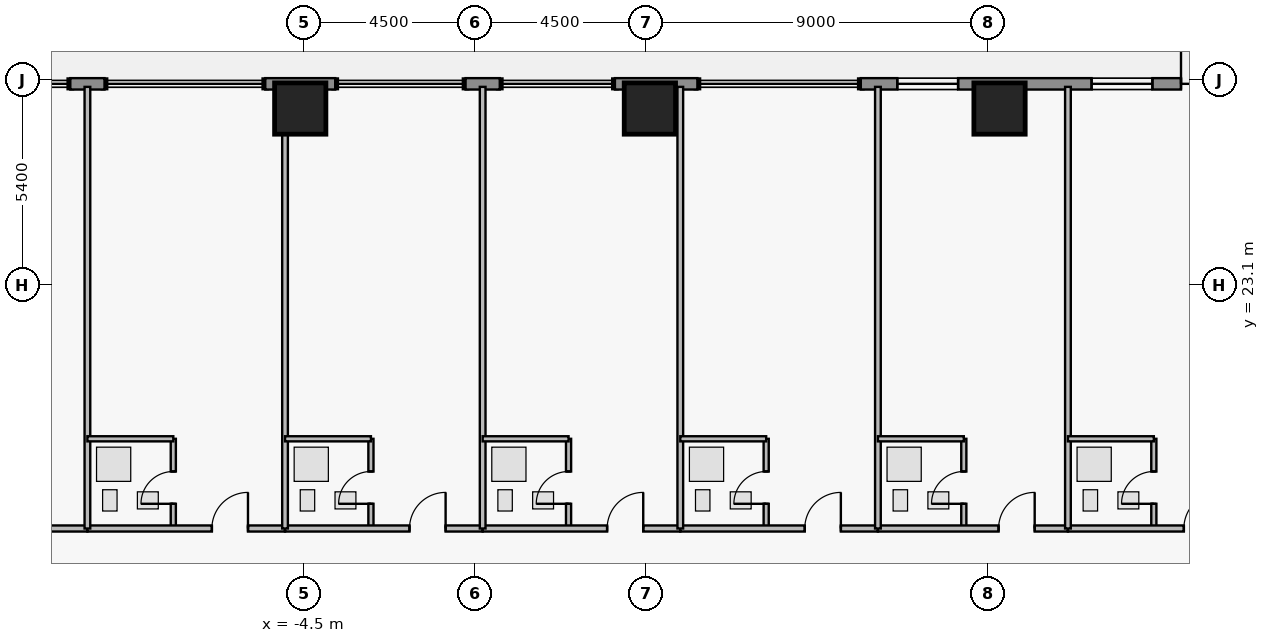
"""IFC4 building model, lengths in metres.
Left out: names, types, materials, properties, quantities, classifications, styles, units other than length and angle.
Written with IfcOpenShell. Run it as: python <this file> out.ifc"""

import sys

from ifc_helpers import new_model, si_unit, direction, frame, frame_2d, origin, origin_2d, place, context, subcontext, project, spatial, rectangle, extrude, element, fill, save


model = new_model("IFC4")
c1 = context("Model", 3, precision=1e-05, world=origin(), true_north=direction((0.0, 1.0)))
c2 = subcontext(c1, "Body", "Model", "MODEL_VIEW")
j1 = project(units=[si_unit("LENGTHUNIT", "METRE"), si_unit("PLANEANGLEUNIT", "RADIAN")], contexts=[c1])
p1 = place(None, origin())
s1 = spatial("IfcSite", under=j1, at=p1, CompositionType="ELEMENT")
p2 = place(p1, origin())
s2 = spatial("IfcBuilding", under=s1, at=p2, CompositionType="ELEMENT")
p3 = place(p2, frame((0.0, 0.0, 150.4)))
s3 = spatial("IfcBuildingStorey", under=s2, at=p3, CompositionType="ELEMENT", Elevation=150.4)
for number, where, z_axis, x_axis in (
    (1, (-4.6, 27.75, 0.0), (0.0, 0.0, 1.0), (1.0, 0.0, 0.0)),
    (2, (4.6, 27.75, 0.0), (0.0, 0.0, 1.0), (1.0, 0.0, 0.0)),
    (3, (13.8, 27.75, 0.0), (0.0, 0.0, 1.0), (1.0, 0.0, 0.0)),
):
    element("IfcColumn", number, at=place(p3, frame(where, z_axis=z_axis, x_axis=x_axis)), inside=s3, PredefinedType="COLUMN", context=c2, shape_type="SweptSolid", body=[
        extrude(rectangle(XDim=1.35, YDim=1.35, at=origin_2d()), origin(), (0.0, 0.0, 1.0), 3.65),
    ])
p4 = place(p3, frame((-10.65, 28.4, 0.0), z_axis=(0.0, 0.0, 1.0), x_axis=(1.0, 0.0, 0.0)))
e4 = element("IfcWall", 4, at=p4, inside=s3, PredefinedType="STANDARD", context=c2, shape_type="SweptSolid", body=[
    extrude(rectangle(XDim=0.9, YDim=0.3, at=frame_2d((0.45, 0.0))), origin(), (0.0, 0.0, 1.0), 3.43),
])
p5 = place(p3, frame((-5.52, 28.4, 0.0), z_axis=(0.0, 0.0, 1.0), x_axis=(1.0, 0.0, 0.0)))
e5 = element("IfcWall", 5, at=p5, inside=s3, PredefinedType="STANDARD", context=c2, shape_type="SweptSolid", body=[
    extrude(rectangle(XDim=1.84, YDim=0.3, at=frame_2d((0.92, 0.0))), origin(), (0.0, 0.0, 1.0), 3.43),
])
p6 = place(p3, frame((-0.25, 28.4, 0.0), z_axis=(0.0, 0.0, 1.0), x_axis=(1.0, 0.0, 0.0)))
e6 = element("IfcWall", 6, at=p6, inside=s3, PredefinedType="STANDARD", context=c2, shape_type="SweptSolid", body=[
    extrude(rectangle(XDim=0.9, YDim=0.3, at=frame_2d((0.45, 0.0))), origin(), (0.0, 0.0, 1.0), 3.43),
])
p7 = place(p3, frame((3.68, 28.4, 0.0), z_axis=(0.0, 0.0, 1.0), x_axis=(1.0, 0.0, 0.0)))
e7 = element("IfcWall", 7, at=p7, inside=s3, PredefinedType="STANDARD", context=c2, shape_type="SweptSolid", body=[
    extrude(rectangle(XDim=2.17, YDim=0.3, at=frame_2d((1.085, 0.0))), origin(), (0.0, 0.0, 1.0), 3.43),
])
p8 = place(p3, frame((10.15, 28.4, 0.0), z_axis=(0.0, 0.0, 1.0), x_axis=(1.0, 0.0, 0.0)))
e8 = element("IfcWall", 8, at=p8, inside=s3, PredefinedType="STANDARD", context=c2, shape_type="SweptSolid", body=[
    extrude(rectangle(XDim=10.25, YDim=0.3, at=frame_2d((5.125, 0.0))), origin(), (0.0, 0.0, 1.0), 3.43),
])
p9 = place(p8, frame((8.425, 0.0, 0.0)))
e9 = element("IfcOpeningElement", 9, at=p9, cuts=e8, PredefinedType="OPENING", context=c2, shape_type="SweptSolid", body=[
    extrude(rectangle(XDim=1.05, YDim=2.2, at=frame_2d((0.525, 1.1))), frame((0.0, 0.16, 0.0), z_axis=(0.0, -1.0, 0.0), x_axis=(1.0, 0.0, 0.0)), (0.0, 0.0, 1.0), 0.32),
])
p10 = place(p8, frame((0.96, 0.0, 0.85)))
e10 = element("IfcOpeningElement", 10, at=p10, cuts=e8, PredefinedType="OPENING", context=c2, shape_type="SweptSolid", body=[
    extrude(rectangle(XDim=1.6, YDim=1.8, at=frame_2d((0.8, 0.9))), frame((0.0, 0.16, 0.0), z_axis=(0.0, -1.0, 0.0), x_axis=(1.0, 0.0, 0.0)), (0.0, 0.0, 1.0), 0.32),
])
p11 = place(p8, frame((6.073, 0.0, 0.85)))
e11 = element("IfcOpeningElement", 11, at=p11, cuts=e8, PredefinedType="OPENING", context=c2, shape_type="SweptSolid", body=[
    extrude(rectangle(XDim=1.6, YDim=1.8, at=frame_2d((0.8, 0.9))), frame((0.0, 0.16, 0.0), z_axis=(0.0, -1.0, 0.0), x_axis=(1.0, 0.0, 0.0)), (0.0, 0.0, 1.0), 0.32),
])
p12 = place(p3, frame((-15.4, 16.7, 0.0), z_axis=(0.0, 0.0, 1.0), x_axis=(1.0, 0.0, 0.0)))
e12 = element("IfcWall", 12, at=p12, inside=s3, PredefinedType="PARTITIONING", context=c2, shape_type="SweptSolid", body=[
    extrude(rectangle(XDim=5.2, YDim=0.16, at=frame_2d((2.6, 0.0))), origin(), (0.0, 0.0, 1.0), 2.973),
])
p13 = place(p12, frame((3.275, 0.0, 0.0)))
e13 = element("IfcOpeningElement", 13, at=p13, cuts=e12, PredefinedType="OPENING", context=c2, shape_type="SweptSolid", body=[
    extrude(rectangle(XDim=0.95, YDim=2.15, at=frame_2d((0.475, 1.075))), frame((0.0, 0.09, 0.0), z_axis=(0.0, -1.0, 0.0), x_axis=(1.0, 0.0, 0.0)), (0.0, 0.0, 1.0), 0.18),
])
p14 = place(p3, frame((-7.94, 16.7, 0.0), z_axis=(0.0, 0.0, 1.0), x_axis=(0.0, 1.0, 0.0)))
e14 = element("IfcWall", 14, at=p14, inside=s3, PredefinedType="PLUMBINGWALL", context=c2, shape_type="SweptSolid", body=[
    extrude(rectangle(XDim=2.36, YDim=0.135, at=frame_2d((1.18, 0.0))), origin(), (0.0, 0.0, 1.0), 3.43),
])
p15 = place(p14, frame((0.65, 0.0, 0.0)))
e15 = element("IfcOpeningElement", 15, at=p15, cuts=e14, PredefinedType="OPENING", context=c2, shape_type="SweptSolid", body=[
    extrude(rectangle(XDim=0.85, YDim=2.1, at=frame_2d((0.425, 1.05))), frame((0.0, 0.077, 0.0), z_axis=(0.0, -1.0, 0.0), x_axis=(1.0, 0.0, 0.0)), (0.0, 0.0, 1.0), 0.155),
])
p16 = place(p3, frame((-10.2, 16.7, 0.0), z_axis=(0.0, 0.0, 1.0), x_axis=(1.0, 0.0, 0.0)))
e16 = element("IfcWall", 16, at=p16, inside=s3, PredefinedType="PARTITIONING", context=c2, shape_type="SweptSolid", body=[
    extrude(rectangle(XDim=5.2, YDim=0.16, at=frame_2d((2.6, 0.0))), origin(), (0.0, 0.0, 1.0), 2.973),
])
p17 = place(p16, frame((3.275, 0.0, 0.0)))
e17 = element("IfcOpeningElement", 17, at=p17, cuts=e16, PredefinedType="OPENING", context=c2, shape_type="SweptSolid", body=[
    extrude(rectangle(XDim=0.95, YDim=2.15, at=frame_2d((0.475, 1.075))), frame((0.0, 0.09, 0.0), z_axis=(0.0, -1.0, 0.0), x_axis=(1.0, 0.0, 0.0)), (0.0, 0.0, 1.0), 0.18),
])
p18 = place(p3, frame((-2.74, 16.7, 0.0), z_axis=(0.0, 0.0, 1.0), x_axis=(0.0, 1.0, 0.0)))
e18 = element("IfcWall", 18, at=p18, inside=s3, PredefinedType="PLUMBINGWALL", context=c2, shape_type="SweptSolid", body=[
    extrude(rectangle(XDim=2.36, YDim=0.135, at=frame_2d((1.18, 0.0))), origin(), (0.0, 0.0, 1.0), 3.43),
])
p19 = place(p18, frame((0.65, 0.0, 0.0)))
e19 = element("IfcOpeningElement", 19, at=p19, cuts=e18, PredefinedType="OPENING", context=c2, shape_type="SweptSolid", body=[
    extrude(rectangle(XDim=0.85, YDim=2.1, at=frame_2d((0.425, 1.05))), frame((0.0, 0.077, 0.0), z_axis=(0.0, -1.0, 0.0), x_axis=(1.0, 0.0, 0.0)), (0.0, 0.0, 1.0), 0.155),
])
p20 = place(p3, frame((-5.0, 16.7, 0.0), z_axis=(0.0, 0.0, 1.0), x_axis=(1.0, 0.0, 0.0)))
e20 = element("IfcWall", 20, at=p20, inside=s3, PredefinedType="PARTITIONING", context=c2, shape_type="SweptSolid", body=[
    extrude(rectangle(XDim=5.2, YDim=0.16, at=frame_2d((2.6, 0.0))), origin(), (0.0, 0.0, 1.0), 2.973),
])
p21 = place(p20, frame((3.275, 0.0, 0.0)))
e21 = element("IfcOpeningElement", 21, at=p21, cuts=e20, PredefinedType="OPENING", context=c2, shape_type="SweptSolid", body=[
    extrude(rectangle(XDim=0.95, YDim=2.15, at=frame_2d((0.475, 1.075))), frame((0.0, 0.09, 0.0), z_axis=(0.0, -1.0, 0.0), x_axis=(1.0, 0.0, 0.0)), (0.0, 0.0, 1.0), 0.18),
])
p22 = place(p3, frame((2.46, 16.7, 0.0), z_axis=(0.0, 0.0, 1.0), x_axis=(0.0, 1.0, 0.0)))
e22 = element("IfcWall", 22, at=p22, inside=s3, PredefinedType="PLUMBINGWALL", context=c2, shape_type="SweptSolid", body=[
    extrude(rectangle(XDim=2.36, YDim=0.135, at=frame_2d((1.18, 0.0))), origin(), (0.0, 0.0, 1.0), 3.43),
])
p23 = place(p22, frame((0.65, 0.0, 0.0)))
e23 = element("IfcOpeningElement", 23, at=p23, cuts=e22, PredefinedType="OPENING", context=c2, shape_type="SweptSolid", body=[
    extrude(rectangle(XDim=0.85, YDim=2.1, at=frame_2d((0.425, 1.05))), frame((0.0, 0.077, 0.0), z_axis=(0.0, -1.0, 0.0), x_axis=(1.0, 0.0, 0.0)), (0.0, 0.0, 1.0), 0.155),
])
p24 = place(p3, frame((0.2, 16.7, 0.0), z_axis=(0.0, 0.0, 1.0), x_axis=(1.0, 0.0, 0.0)))
e24 = element("IfcWall", 24, at=p24, inside=s3, PredefinedType="PARTITIONING", context=c2, shape_type="SweptSolid", body=[
    extrude(rectangle(XDim=5.2, YDim=0.16, at=frame_2d((2.6, 0.0))), origin(), (0.0, 0.0, 1.0), 2.973),
])
p25 = place(p24, frame((3.275, 0.0, 0.0)))
e25 = element("IfcOpeningElement", 25, at=p25, cuts=e24, PredefinedType="OPENING", context=c2, shape_type="SweptSolid", body=[
    extrude(rectangle(XDim=0.95, YDim=2.15, at=frame_2d((0.475, 1.075))), frame((0.0, 0.09, 0.0), z_axis=(0.0, -1.0, 0.0), x_axis=(1.0, 0.0, 0.0)), (0.0, 0.0, 1.0), 0.18),
])
p26 = place(p3, frame((7.66, 16.7, 0.0), z_axis=(0.0, 0.0, 1.0), x_axis=(0.0, 1.0, 0.0)))
e26 = element("IfcWall", 26, at=p26, inside=s3, PredefinedType="PLUMBINGWALL", context=c2, shape_type="SweptSolid", body=[
    extrude(rectangle(XDim=2.36, YDim=0.135, at=frame_2d((1.18, 0.0))), origin(), (0.0, 0.0, 1.0), 3.43),
])
p27 = place(p26, frame((0.65, 0.0, 0.0)))
e27 = element("IfcOpeningElement", 27, at=p27, cuts=e26, PredefinedType="OPENING", context=c2, shape_type="SweptSolid", body=[
    extrude(rectangle(XDim=0.85, YDim=2.1, at=frame_2d((0.425, 1.05))), frame((0.0, 0.077, 0.0), z_axis=(0.0, -1.0, 0.0), x_axis=(1.0, 0.0, 0.0)), (0.0, 0.0, 1.0), 0.155),
])
p28 = place(p3, frame((5.4, 16.7, 0.0), z_axis=(0.0, 0.0, 1.0), x_axis=(1.0, 0.0, 0.0)))
e28 = element("IfcWall", 28, at=p28, inside=s3, PredefinedType="PARTITIONING", context=c2, shape_type="SweptSolid", body=[
    extrude(rectangle(XDim=5.2, YDim=0.16, at=frame_2d((2.6, 0.0))), origin(), (0.0, 0.0, 1.0), 2.973),
])
p29 = place(p28, frame((3.275, 0.0, 0.0)))
e29 = element("IfcOpeningElement", 29, at=p29, cuts=e28, PredefinedType="OPENING", context=c2, shape_type="SweptSolid", body=[
    extrude(rectangle(XDim=0.95, YDim=2.15, at=frame_2d((0.475, 1.075))), frame((0.0, 0.09, 0.0), z_axis=(0.0, -1.0, 0.0), x_axis=(1.0, 0.0, 0.0)), (0.0, 0.0, 1.0), 0.18),
])
p30 = place(p3, frame((12.86, 16.7, 0.0), z_axis=(0.0, 0.0, 1.0), x_axis=(0.0, 1.0, 0.0)))
e30 = element("IfcWall", 30, at=p30, inside=s3, PredefinedType="PLUMBINGWALL", context=c2, shape_type="SweptSolid", body=[
    extrude(rectangle(XDim=2.36, YDim=0.135, at=frame_2d((1.18, 0.0))), origin(), (0.0, 0.0, 1.0), 3.43),
])
p31 = place(p30, frame((0.65, 0.0, 0.0)))
e31 = element("IfcOpeningElement", 31, at=p31, cuts=e30, PredefinedType="OPENING", context=c2, shape_type="SweptSolid", body=[
    extrude(rectangle(XDim=0.85, YDim=2.1, at=frame_2d((0.425, 1.05))), frame((0.0, 0.077, 0.0), z_axis=(0.0, -1.0, 0.0), x_axis=(1.0, 0.0, 0.0)), (0.0, 0.0, 1.0), 0.155),
])
p32 = place(p3, frame((10.6, 16.7, 0.0), z_axis=(0.0, 0.0, 1.0), x_axis=(1.0, 0.0, 0.0)))
e32 = element("IfcWall", 32, at=p32, inside=s3, PredefinedType="PARTITIONING", context=c2, shape_type="SweptSolid", body=[
    extrude(rectangle(XDim=5.0, YDim=0.16, at=frame_2d((2.5, 0.0))), origin(), (0.0, 0.0, 1.0), 2.973),
])
p33 = place(p32, frame((3.175, 0.0, 0.0)))
e33 = element("IfcOpeningElement", 33, at=p33, cuts=e32, PredefinedType="OPENING", context=c2, shape_type="SweptSolid", body=[
    extrude(rectangle(XDim=0.95, YDim=2.15, at=frame_2d((0.475, 1.075))), frame((0.0, 0.09, 0.0), z_axis=(0.0, -1.0, 0.0), x_axis=(1.0, 0.0, 0.0)), (0.0, 0.0, 1.0), 0.18),
])
p34 = place(p3, frame((17.86, 16.7, 0.0), z_axis=(0.0, 0.0, 1.0), x_axis=(0.0, 1.0, 0.0)))
e34 = element("IfcWall", 34, at=p34, inside=s3, PredefinedType="PLUMBINGWALL", context=c2, shape_type="SweptSolid", body=[
    extrude(rectangle(XDim=2.36, YDim=0.135, at=frame_2d((1.18, 0.0))), origin(), (0.0, 0.0, 1.0), 3.43),
])
p35 = place(p34, frame((0.65, 0.0, 0.0)))
e35 = element("IfcOpeningElement", 35, at=p35, cuts=e34, PredefinedType="OPENING", context=c2, shape_type="SweptSolid", body=[
    extrude(rectangle(XDim=0.85, YDim=2.1, at=frame_2d((0.425, 1.05))), frame((0.0, 0.077, 0.0), z_axis=(0.0, -1.0, 0.0), x_axis=(1.0, 0.0, 0.0)), (0.0, 0.0, 1.0), 0.155),
])
p36 = place(p3, frame((15.6, 16.7, 0.0), z_axis=(0.0, 0.0, 1.0), x_axis=(1.0, 0.0, 0.0)))
e36 = element("IfcWall", 36, at=p36, inside=s3, PredefinedType="PARTITIONING", context=c2, shape_type="SweptSolid", body=[
    extrude(rectangle(XDim=5.0, YDim=0.16, at=frame_2d((2.5, 0.0))), origin(), (0.0, 0.0, 1.0), 3.43),
])
p37 = place(p36, frame((3.05, 0.0, 0.0)))
e37 = element("IfcOpeningElement", 37, at=p37, cuts=e36, PredefinedType="OPENING", context=c2, shape_type="SweptSolid", body=[
    extrude(rectangle(XDim=0.95, YDim=2.15, at=frame_2d((0.475, 1.075))), frame((0.0, 0.09, 0.0), z_axis=(0.0, -1.0, 0.0), x_axis=(1.0, 0.0, 0.0)), (0.0, 0.0, 1.0), 0.18),
])
p38 = place(p3, frame((-10.2, 16.7, 0.0), z_axis=(0.0, 0.0, 1.0), x_axis=(0.0, 1.0, 0.0)))
e38 = element("IfcWall", 38, at=p38, inside=s3, PredefinedType="PARTITIONING", context=c2, shape_type="SweptSolid", body=[
    extrude(rectangle(XDim=11.62, YDim=0.15, at=frame_2d((5.81, 0.0))), origin(), (0.0, 0.0, 1.0), 3.43),
])
p39 = place(p3, frame((-10.2, 19.06, 0.0), z_axis=(0.0, 0.0, 1.0), x_axis=(1.0, 0.0, 0.0)))
e39 = element("IfcWall", 39, at=p39, inside=s3, PredefinedType="PLUMBINGWALL", context=c2, shape_type="SweptSolid", body=[
    extrude(rectangle(XDim=2.26, YDim=0.135, at=frame_2d((1.13, 0.0))), origin(), (0.0, 0.0, 1.0), 2.973),
])
p40 = place(p3, frame((-5.0, 16.7, 0.0), z_axis=(0.0, 0.0, 1.0), x_axis=(0.0, 1.0, 0.0)))
e40 = element("IfcWall", 40, at=p40, inside=s3, PredefinedType="PARTITIONING", context=c2, shape_type="SweptSolid", body=[
    extrude(rectangle(XDim=11.62, YDim=0.15, at=frame_2d((5.81, 0.0))), origin(), (0.0, 0.0, 1.0), 2.503),
])
p41 = place(p3, frame((-5.0, 19.06, 0.0), z_axis=(0.0, 0.0, 1.0), x_axis=(1.0, 0.0, 0.0)))
e41 = element("IfcWall", 41, at=p41, inside=s3, PredefinedType="PLUMBINGWALL", context=c2, shape_type="SweptSolid", body=[
    extrude(rectangle(XDim=2.26, YDim=0.135, at=frame_2d((1.13, 0.0))), origin(), (0.0, 0.0, 1.0), 2.973),
])
p42 = place(p3, frame((0.2, 16.7, 0.0), z_axis=(0.0, 0.0, 1.0), x_axis=(0.0, 1.0, 0.0)))
e42 = element("IfcWall", 42, at=p42, inside=s3, PredefinedType="PARTITIONING", context=c2, shape_type="SweptSolid", body=[
    extrude(rectangle(XDim=11.62, YDim=0.15, at=frame_2d((5.81, 0.0))), origin(), (0.0, 0.0, 1.0), 3.43),
])
p43 = place(p3, frame((0.2, 19.06, 0.0), z_axis=(0.0, 0.0, 1.0), x_axis=(1.0, 0.0, 0.0)))
e43 = element("IfcWall", 43, at=p43, inside=s3, PredefinedType="PLUMBINGWALL", context=c2, shape_type="SweptSolid", body=[
    extrude(rectangle(XDim=2.26, YDim=0.135, at=frame_2d((1.13, 0.0))), origin(), (0.0, 0.0, 1.0), 2.973),
])
p44 = place(p3, frame((5.4, 16.7, 0.0), z_axis=(0.0, 0.0, 1.0), x_axis=(0.0, 1.0, 0.0)))
e44 = element("IfcWall", 44, at=p44, inside=s3, PredefinedType="PARTITIONING", context=c2, shape_type="SweptSolid", body=[
    extrude(rectangle(XDim=11.62, YDim=0.15, at=frame_2d((5.81, 0.0))), origin(), (0.0, 0.0, 1.0), 3.43),
])
p45 = place(p3, frame((5.4, 19.06, 0.0), z_axis=(0.0, 0.0, 1.0), x_axis=(1.0, 0.0, 0.0)))
e45 = element("IfcWall", 45, at=p45, inside=s3, PredefinedType="PLUMBINGWALL", context=c2, shape_type="SweptSolid", body=[
    extrude(rectangle(XDim=2.26, YDim=0.135, at=frame_2d((1.13, 0.0))), origin(), (0.0, 0.0, 1.0), 2.973),
])
p46 = place(p3, frame((10.6, 16.7, 0.0), z_axis=(0.0, 0.0, 1.0), x_axis=(0.0, 1.0, 0.0)))
e46 = element("IfcWall", 46, at=p46, inside=s3, PredefinedType="PARTITIONING", context=c2, shape_type="SweptSolid", body=[
    extrude(rectangle(XDim=11.62, YDim=0.15, at=frame_2d((5.81, 0.0))), origin(), (0.0, 0.0, 1.0), 3.43),
])
p47 = place(p3, frame((10.6, 19.06, 0.0), z_axis=(0.0, 0.0, 1.0), x_axis=(1.0, 0.0, 0.0)))
e47 = element("IfcWall", 47, at=p47, inside=s3, PredefinedType="PLUMBINGWALL", context=c2, shape_type="SweptSolid", body=[
    extrude(rectangle(XDim=2.26, YDim=0.135, at=frame_2d((1.13, 0.0))), origin(), (0.0, 0.0, 1.0), 2.973),
])
p48 = place(p3, frame((15.6, 16.7, 0.0), z_axis=(0.0, 0.0, 1.0), x_axis=(0.0, 1.0, 0.0)))
e48 = element("IfcWall", 48, at=p48, inside=s3, PredefinedType="PARTITIONING", context=c2, shape_type="SweptSolid", body=[
    extrude(rectangle(XDim=11.62, YDim=0.15, at=frame_2d((5.81, 0.0))), origin(), (0.0, 0.0, 1.0), 3.43),
])
p49 = place(p3, frame((15.6, 19.06, 0.0), z_axis=(0.0, 0.0, 1.0), x_axis=(1.0, 0.0, 0.0)))
e49 = element("IfcWall", 49, at=p49, inside=s3, PredefinedType="PLUMBINGWALL", context=c2, shape_type="SweptSolid", body=[
    extrude(rectangle(XDim=2.26, YDim=0.135, at=frame_2d((1.13, 0.0))), origin(), (0.0, 0.0, 1.0), 3.43),
])
p50 = place(p9, origin())
e50 = element("IfcDoor", 50, at=p50, inside=s3, OperationType="SINGLE_SWING_LEFT", PredefinedType="DOOR", context=c2, shape_type="SweptSolid", body=[
    extrude(rectangle(XDim=1.05, YDim=2.2, at=frame_2d((0.525, 1.1))), frame((0.0, 0.025, 0.0), z_axis=(0.0, -1.0, 0.0), x_axis=(1.0, 0.0, 0.0)), (0.0, 0.0, 1.0), 0.05),
])
fill(e9, e50)
p51 = place(p10, origin())
e51 = element("IfcWindow", 51, at=p51, inside=s3, PartitioningType="SINGLE_PANEL", PredefinedType="WINDOW", context=c2, shape_type="SweptSolid", body=[
    extrude(rectangle(XDim=1.6, YDim=1.8, at=frame_2d((0.8, 0.9))), frame((0.0, 0.03, 0.0), z_axis=(0.0, -1.0, 0.0), x_axis=(1.0, 0.0, 0.0)), (0.0, 0.0, 1.0), 0.06),
])
fill(e10, e51)
p52 = place(p11, origin())
e52 = element("IfcWindow", 52, at=p52, inside=s3, PartitioningType="SINGLE_PANEL", PredefinedType="WINDOW", context=c2, shape_type="SweptSolid", body=[
    extrude(rectangle(XDim=1.6, YDim=1.8, at=frame_2d((0.8, 0.9))), frame((0.0, 0.03, 0.0), z_axis=(0.0, -1.0, 0.0), x_axis=(1.0, 0.0, 0.0)), (0.0, 0.0, 1.0), 0.06),
])
fill(e11, e52)
p53 = place(p15, origin())
e53 = element("IfcDoor", 53, at=p53, inside=s3, OperationType="SINGLE_SWING_LEFT", PredefinedType="DOOR", context=c2, shape_type="SweptSolid", body=[
    extrude(rectangle(XDim=0.85, YDim=2.1, at=frame_2d((0.425, 1.05))), frame((0.0, 0.025, 0.0), z_axis=(0.0, -1.0, 0.0), x_axis=(1.0, 0.0, 0.0)), (0.0, 0.0, 1.0), 0.05),
])
fill(e15, e53)
p54 = place(p17, origin())
e54 = element("IfcDoor", 54, at=p54, inside=s3, OperationType="SINGLE_SWING_RIGHT", PredefinedType="DOOR", context=c2, shape_type="SweptSolid", body=[
    extrude(rectangle(XDim=0.95, YDim=2.15, at=frame_2d((0.475, 1.075))), frame((0.0, 0.025, 0.0), z_axis=(0.0, -1.0, 0.0), x_axis=(1.0, 0.0, 0.0)), (0.0, 0.0, 1.0), 0.05),
])
fill(e17, e54)
p55 = place(p19, origin())
e55 = element("IfcDoor", 55, at=p55, inside=s3, OperationType="SINGLE_SWING_LEFT", PredefinedType="DOOR", context=c2, shape_type="SweptSolid", body=[
    extrude(rectangle(XDim=0.85, YDim=2.1, at=frame_2d((0.425, 1.05))), frame((0.0, 0.025, 0.0), z_axis=(0.0, -1.0, 0.0), x_axis=(1.0, 0.0, 0.0)), (0.0, 0.0, 1.0), 0.05),
])
fill(e19, e55)
p56 = place(p21, origin())
e56 = element("IfcDoor", 56, at=p56, inside=s3, OperationType="SINGLE_SWING_RIGHT", PredefinedType="DOOR", context=c2, shape_type="SweptSolid", body=[
    extrude(rectangle(XDim=0.95, YDim=2.15, at=frame_2d((0.475, 1.075))), frame((0.0, 0.025, 0.0), z_axis=(0.0, -1.0, 0.0), x_axis=(1.0, 0.0, 0.0)), (0.0, 0.0, 1.0), 0.05),
])
fill(e21, e56)
p57 = place(p23, origin())
e57 = element("IfcDoor", 57, at=p57, inside=s3, OperationType="SINGLE_SWING_LEFT", PredefinedType="DOOR", context=c2, shape_type="SweptSolid", body=[
    extrude(rectangle(XDim=0.85, YDim=2.1, at=frame_2d((0.425, 1.05))), frame((0.0, 0.025, 0.0), z_axis=(0.0, -1.0, 0.0), x_axis=(1.0, 0.0, 0.0)), (0.0, 0.0, 1.0), 0.05),
])
fill(e23, e57)
p58 = place(p25, origin())
e58 = element("IfcDoor", 58, at=p58, inside=s3, OperationType="SINGLE_SWING_RIGHT", PredefinedType="DOOR", context=c2, shape_type="SweptSolid", body=[
    extrude(rectangle(XDim=0.95, YDim=2.15, at=frame_2d((0.475, 1.075))), frame((0.0, 0.025, 0.0), z_axis=(0.0, -1.0, 0.0), x_axis=(1.0, 0.0, 0.0)), (0.0, 0.0, 1.0), 0.05),
])
fill(e25, e58)
p59 = place(p27, origin())
e59 = element("IfcDoor", 59, at=p59, inside=s3, OperationType="SINGLE_SWING_LEFT", PredefinedType="DOOR", context=c2, shape_type="SweptSolid", body=[
    extrude(rectangle(XDim=0.85, YDim=2.1, at=frame_2d((0.425, 1.05))), frame((0.0, 0.025, 0.0), z_axis=(0.0, -1.0, 0.0), x_axis=(1.0, 0.0, 0.0)), (0.0, 0.0, 1.0), 0.05),
])
fill(e27, e59)
p60 = place(p29, origin())
e60 = element("IfcDoor", 60, at=p60, inside=s3, OperationType="SINGLE_SWING_RIGHT", PredefinedType="DOOR", context=c2, shape_type="SweptSolid", body=[
    extrude(rectangle(XDim=0.95, YDim=2.15, at=frame_2d((0.475, 1.075))), frame((0.0, 0.025, 0.0), z_axis=(0.0, -1.0, 0.0), x_axis=(1.0, 0.0, 0.0)), (0.0, 0.0, 1.0), 0.05),
])
fill(e29, e60)
p61 = place(p31, origin())
e61 = element("IfcDoor", 61, at=p61, inside=s3, OperationType="SINGLE_SWING_LEFT", PredefinedType="DOOR", context=c2, shape_type="SweptSolid", body=[
    extrude(rectangle(XDim=0.85, YDim=2.1, at=frame_2d((0.425, 1.05))), frame((0.0, 0.025, 0.0), z_axis=(0.0, -1.0, 0.0), x_axis=(1.0, 0.0, 0.0)), (0.0, 0.0, 1.0), 0.05),
])
fill(e31, e61)
p62 = place(p33, origin())
e62 = element("IfcDoor", 62, at=p62, inside=s3, OperationType="SINGLE_SWING_RIGHT", PredefinedType="DOOR", context=c2, shape_type="SweptSolid", body=[
    extrude(rectangle(XDim=0.95, YDim=2.15, at=frame_2d((0.475, 1.075))), frame((0.0, 0.025, 0.0), z_axis=(0.0, -1.0, 0.0), x_axis=(1.0, 0.0, 0.0)), (0.0, 0.0, 1.0), 0.05),
])
fill(e33, e62)
p63 = place(p35, origin())
e63 = element("IfcDoor", 63, at=p63, inside=s3, OperationType="SINGLE_SWING_LEFT", PredefinedType="DOOR", context=c2, shape_type="SweptSolid", body=[
    extrude(rectangle(XDim=0.85, YDim=2.1, at=frame_2d((0.425, 1.05))), frame((0.0, 0.025, 0.0), z_axis=(0.0, -1.0, 0.0), x_axis=(1.0, 0.0, 0.0)), (0.0, 0.0, 1.0), 0.05),
])
fill(e35, e63)
p64 = place(p37, origin())
e64 = element("IfcDoor", 64, at=p64, inside=s3, OperationType="SINGLE_SWING_RIGHT", PredefinedType="DOOR", context=c2, shape_type="SweptSolid", body=[
    extrude(rectangle(XDim=0.95, YDim=2.15, at=frame_2d((0.475, 1.075))), frame((0.0, 0.025, 0.0), z_axis=(0.0, -1.0, 0.0), x_axis=(1.0, 0.0, 0.0)), (0.0, 0.0, 1.0), 0.05),
])
fill(e37, e64)
save(model, sys.argv[1])
